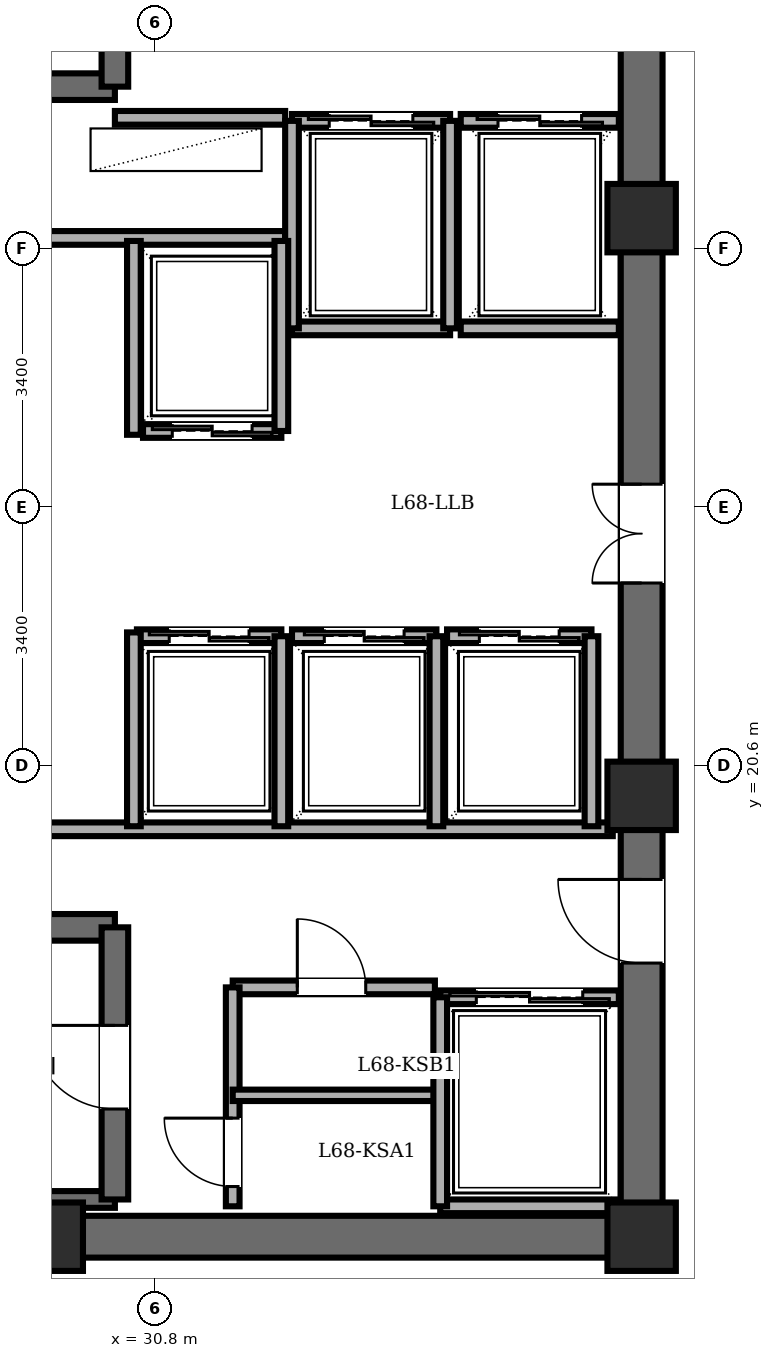
"""IFC4 building model, lengths in metres.
Left out: names, types, materials, properties, quantities, classifications, styles, units other than length and angle.
Written with IfcOpenShell. Run it as: python <this file> out.ifc"""

import sys

from ifc_helpers import new_model, si_unit, direction, frame, frame_2d, origin, origin_2d, place, context, subcontext, project, spatial, rectangle, extrude, element, fill, save


model = new_model("IFC4")
c1 = context("Model", 3, precision=1e-05, world=origin(), true_north=direction((0.0, 1.0)))
c2 = subcontext(c1, "Body", "Model", "MODEL_VIEW")
j1 = project(units=[si_unit("LENGTHUNIT", "METRE"), si_unit("PLANEANGLEUNIT", "RADIAN")], contexts=[c1])
p1 = place(None, origin())
s1 = spatial("IfcSite", under=j1, at=p1, CompositionType="ELEMENT")
p2 = place(p1, origin())
s2 = spatial("IfcBuilding", under=s1, at=p2, CompositionType="ELEMENT")
p3 = place(p2, frame((0.0, 0.0, 262.45)))
s3 = spatial("IfcBuildingStorey", under=s2, at=p3, CompositionType="ELEMENT", Elevation=262.45)
for number, where, z_axis, x_axis in (
    (1, (29.4, 14.4, 0.0), (0.0, 0.0, 1.0), (1.0, 0.0, 0.0)),
    (2, (37.2, 14.4, 0.0), (0.0, 0.0, 1.0), (1.0, 0.0, 0.0)),
    (3, (37.2, 20.2, 0.0), (0.0, 0.0, 1.0), (1.0, 0.0, 0.0)),
    (4, (37.2, 27.8, 0.0), (0.0, 0.0, 1.0), (1.0, 0.0, 0.0)),
):
    element("IfcColumn", number, at=place(p3, frame(where, z_axis=z_axis, x_axis=x_axis)), inside=s3, PredefinedType="COLUMN", context=c2, shape_type="SweptSolid", body=[
        extrude(rectangle(XDim=0.9, YDim=0.9, at=origin_2d()), origin(), (0.0, 0.0, 1.0), 3.65),
    ])
p4 = place(p3, frame((37.2, 14.4, 0.0), z_axis=(0.0, 0.0, 1.0), x_axis=(-1.0, 0.0, 0.0)))
e5 = element("IfcWall", 5, at=p4, inside=s3, PredefinedType="SHEAR", context=c2, shape_type="SweptSolid", body=[
    extrude(rectangle(XDim=15.6, YDim=0.55, at=frame_2d((7.8, 0.0))), origin(), (0.0, 0.0, 1.0), 3.45),
])
p5 = place(p3, frame((37.2, 14.4, 0.0), z_axis=(0.0, 0.0, 1.0), x_axis=(0.0, 1.0, 0.0)))
e6 = element("IfcWall", 6, at=p5, inside=s3, PredefinedType="SHEAR", context=c2, shape_type="SweptSolid", body=[
    extrude(rectangle(XDim=19.2, YDim=0.55, at=frame_2d((9.6, 0.0))), origin(), (0.0, 0.0, 1.0), 3.45),
])
p6 = place(p5, frame((15.8, 0.0, 0.0)))
e7 = element("IfcOpeningElement", 7, at=p6, cuts=e6, PredefinedType="OPENING", context=c2, shape_type="SweptSolid", body=[
    extrude(rectangle(XDim=1.15, YDim=2.15, at=frame_2d((0.575, 1.075))), frame((0.0, 0.285, 0.0), z_axis=(0.0, -1.0, 0.0), x_axis=(1.0, 0.0, 0.0)), (0.0, 0.0, 1.0), 0.57),
])
p7 = place(p5, frame((3.6, 0.0, 0.0)))
e8 = element("IfcOpeningElement", 8, at=p7, cuts=e6, PredefinedType="OPENING", context=c2, shape_type="SweptSolid", body=[
    extrude(rectangle(XDim=1.1, YDim=2.15, at=frame_2d((0.55, 1.075))), frame((0.0, 0.285, 0.0), z_axis=(0.0, -1.0, 0.0), x_axis=(1.0, 0.0, 0.0)), (0.0, 0.0, 1.0), 0.57),
])
p8 = place(p5, frame((8.6, 0.0, 0.0)))
e9 = element("IfcOpeningElement", 9, at=p8, cuts=e6, PredefinedType="OPENING", context=c2, shape_type="SweptSolid", body=[
    extrude(rectangle(XDim=1.3, YDim=2.2, at=frame_2d((0.65, 1.1))), frame((0.0, 0.285, 0.0), z_axis=(0.0, -1.0, 0.0), x_axis=(1.0, 0.0, 0.0)), (0.0, 0.0, 1.0), 0.57),
])
p9 = place(p3, frame((22.48, 29.53, 0.0), z_axis=(0.0, 0.0, 1.0), x_axis=(1.0, 0.0, 0.0)))
e10 = element("IfcWall", 10, at=p9, inside=s3, PredefinedType="SOLIDWALL", context=c2, shape_type="SweptSolid", body=[
    extrude(rectangle(XDim=7.79, YDim=0.35, at=frame_2d((3.895, 0.0))), origin(), (0.0, 0.0, 1.0), 3.45),
])
p10 = place(p3, frame((30.27, 29.53, 0.0), z_axis=(0.0, 0.0, 1.0), x_axis=(0.0, 1.0, 0.0)))
e11 = element("IfcWall", 11, at=p10, inside=s3, PredefinedType="SOLIDWALL", context=c2, shape_type="SweptSolid", body=[
    extrude(rectangle(XDim=3.58, YDim=0.35, at=frame_2d((1.79, 0.0))), origin(), (0.0, 0.0, 1.0), 3.45),
])
p11 = place(p10, frame((1.25, 0.0, 0.0)))
e12 = element("IfcOpeningElement", 12, at=p11, cuts=e11, PredefinedType="OPENING", context=c2, shape_type="SweptSolid", body=[
    extrude(rectangle(XDim=1.1, YDim=2.15, at=frame_2d((0.55, 1.075))), frame((0.0, 0.185, 0.0), z_axis=(0.0, -1.0, 0.0), x_axis=(1.0, 0.0, 0.0)), (0.0, 0.0, 1.0), 0.37),
])
p12 = place(p3, frame((22.48, 18.47, 0.0), z_axis=(0.0, 0.0, 1.0), x_axis=(1.0, 0.0, 0.0)))
e13 = element("IfcWall", 13, at=p12, inside=s3, PredefinedType="SOLIDWALL", context=c2, shape_type="SweptSolid", body=[
    extrude(rectangle(XDim=7.79, YDim=0.35, at=frame_2d((3.895, 0.0))), origin(), (0.0, 0.0, 1.0), 3.45),
])
p13 = place(p3, frame((22.48, 14.89, 0.0), z_axis=(0.0, 0.0, 1.0), x_axis=(1.0, 0.0, 0.0)))
e14 = element("IfcWall", 14, at=p13, inside=s3, PredefinedType="PARTITIONING", context=c2, shape_type="SweptSolid", body=[
    extrude(rectangle(XDim=7.79, YDim=0.22, at=frame_2d((3.895, 0.0))), origin(), (0.0, 0.0, 1.0), 3.45),
])
p14 = place(p3, frame((30.27, 14.89, 0.0), z_axis=(0.0, 0.0, 1.0), x_axis=(0.0, 1.0, 0.0)))
e15 = element("IfcWall", 15, at=p14, inside=s3, PredefinedType="SOLIDWALL", context=c2, shape_type="SweptSolid", body=[
    extrude(rectangle(XDim=3.58, YDim=0.35, at=frame_2d((1.79, 0.0))), origin(), (0.0, 0.0, 1.0), 3.45),
])
p15 = place(p14, frame((1.19, 0.0, 0.0)))
e16 = element("IfcOpeningElement", 16, at=p15, cuts=e15, PredefinedType="OPENING", context=c2, shape_type="SweptSolid", body=[
    extrude(rectangle(XDim=1.1, YDim=2.15, at=frame_2d((0.55, 1.075))), frame((0.0, 0.185, 0.0), z_axis=(0.0, -1.0, 0.0), x_axis=(1.0, 0.0, 0.0)), (0.0, 0.0, 1.0), 0.37),
])
p16 = place(p3, frame((30.27, 29.12, 0.0), z_axis=(0.0, 0.0, 1.0), x_axis=(1.0, 0.0, 0.0)))
e17 = element("IfcWall", 17, at=p16, inside=s3, PredefinedType="PARTITIONING", context=c2, shape_type="SweptSolid", body=[
    extrude(rectangle(XDim=2.24, YDim=0.18, at=frame_2d((1.12, 0.0))), origin(), (0.0, 0.0, 1.0), 3.45),
])
p17 = place(p3, frame((21.95, 27.54, 0.0), z_axis=(0.0, 0.0, 1.0), x_axis=(1.0, 0.0, 0.0)))
e18 = element("IfcWall", 18, at=p17, inside=s3, PredefinedType="PARTITIONING", context=c2, shape_type="SweptSolid", body=[
    extrude(rectangle(XDim=10.56, YDim=0.18, at=frame_2d((5.28, 0.0))), origin(), (0.0, 0.0, 1.0), 3.45),
])
p18 = place(p3, frame((21.95, 19.76, 0.0), z_axis=(0.0, 0.0, 1.0), x_axis=(1.0, 0.0, 0.0)))
e19 = element("IfcWall", 19, at=p18, inside=s3, PredefinedType="PARTITIONING", context=c2, shape_type="SweptSolid", body=[
    extrude(rectangle(XDim=14.87, YDim=0.18, at=frame_2d((7.435, 0.0))), origin(), (0.0, 0.0, 1.0), 3.45),
])
p19 = place(p3, frame((31.82, 17.68, 0.0), z_axis=(0.0, 0.0, 1.0), x_axis=(1.0, 0.0, 0.0)))
e20 = element("IfcWall", 20, at=p19, inside=s3, PredefinedType="PARTITIONING", context=c2, shape_type="SweptSolid", body=[
    extrude(rectangle(XDim=2.66, YDim=0.18, at=frame_2d((1.33, 0.0))), origin(), (0.0, 0.0, 1.0), 3.45),
])
p20 = place(p19, frame((0.85, 0.0, 0.0)))
e21 = element("IfcOpeningElement", 21, at=p20, cuts=e20, PredefinedType="OPENING", context=c2, shape_type="SweptSolid", body=[
    extrude(rectangle(XDim=0.9, YDim=2.05, at=frame_2d((0.45, 1.025))), frame((0.0, 0.1, 0.0), z_axis=(0.0, -1.0, 0.0), x_axis=(1.0, 0.0, 0.0)), (0.0, 0.0, 1.0), 0.2),
])
p21 = place(p3, frame((31.82, 14.8, 0.0), z_axis=(0.0, 0.0, 1.0), x_axis=(0.0, 1.0, 0.0)))
e22 = element("IfcWall", 22, at=p21, inside=s3, PredefinedType="PARTITIONING", context=c2, shape_type="SweptSolid", body=[
    extrude(rectangle(XDim=2.88, YDim=0.18, at=frame_2d((1.44, 0.0))), origin(), (0.0, 0.0, 1.0), 3.45),
])
p22 = place(p21, frame((0.26, 0.0, 0.0)))
e23 = element("IfcOpeningElement", 23, at=p22, cuts=e22, PredefinedType="OPENING", context=c2, shape_type="SweptSolid", body=[
    extrude(rectangle(XDim=0.9, YDim=2.05, at=frame_2d((0.45, 1.025))), frame((0.0, 0.1, 0.0), z_axis=(0.0, -1.0, 0.0), x_axis=(1.0, 0.0, 0.0)), (0.0, 0.0, 1.0), 0.2),
])
p23 = place(p3, frame((31.82, 16.26, 0.0), z_axis=(0.0, 0.0, 1.0), x_axis=(1.0, 0.0, 0.0)))
e24 = element("IfcWall", 24, at=p23, inside=s3, PredefinedType="PARTITIONING", context=c2, shape_type="SweptSolid", body=[
    extrude(rectangle(XDim=2.66, YDim=0.15, at=frame_2d((1.33, 0.0))), origin(), (0.0, 0.0, 1.0), 3.45),
])
p24 = place(p3, frame((32.6, 29.08, 0.0), z_axis=(0.0, 0.0, 1.0), x_axis=(1.0, 0.0, 0.0)))
e25 = element("IfcWall", 25, at=p24, inside=s3, PredefinedType="PARTITIONING", context=c2, shape_type="SweptSolid", body=[
    extrude(rectangle(XDim=2.08, YDim=0.18, at=frame_2d((1.04, 0.0))), origin(), (0.0, 0.0, 1.0), 3.45),
])
p25 = place(p24, frame((0.49, 0.0, 0.0)))
e26 = element("IfcOpeningElement", 26, at=p25, cuts=e25, PredefinedType="OPENING", context=c2, shape_type="SweptSolid", body=[
    extrude(rectangle(XDim=1.1, YDim=2.2, at=frame_2d((0.55, 1.1))), frame((0.0, 0.1, 0.0), z_axis=(0.0, -1.0, 0.0), x_axis=(1.0, 0.0, 0.0)), (0.0, 0.0, 1.0), 0.2),
])
p26 = place(p3, frame((34.68, 26.35, 0.0), z_axis=(0.0, 0.0, 1.0), x_axis=(-1.0, 0.0, 0.0)))
e27 = element("IfcWall", 27, at=p26, inside=s3, PredefinedType="PARTITIONING", context=c2, shape_type="SweptSolid", body=[
    extrude(rectangle(XDim=2.08, YDim=0.18, at=frame_2d((1.04, 0.0))), origin(), (0.0, 0.0, 1.0), 3.45),
])
for number, where, z_axis, x_axis in (
    (28, (34.68, 26.35, 0.0), (0.0, 0.0, 1.0), (0.0, 1.0, 0.0)),
    (29, (32.6, 29.08, 0.0), (0.0, 0.0, 1.0), (0.0, -1.0, 0.0)),
):
    element("IfcWall", number, at=place(p3, frame(where, z_axis=z_axis, x_axis=x_axis)), inside=s3, PredefinedType="PARTITIONING", context=c2, shape_type="SweptSolid", body=[
        extrude(rectangle(XDim=2.73, YDim=0.18, at=frame_2d((1.365, 0.0))), origin(), (0.0, 0.0, 1.0), 3.45),
    ])
p27 = place(p3, frame((34.82, 29.08, 0.0), z_axis=(0.0, 0.0, 1.0), x_axis=(1.0, 0.0, 0.0)))
e30 = element("IfcWall", 30, at=p27, inside=s3, PredefinedType="PARTITIONING", context=c2, shape_type="SweptSolid", body=[
    extrude(rectangle(XDim=2.08, YDim=0.18, at=frame_2d((1.04, 0.0))), origin(), (0.0, 0.0, 1.0), 3.45),
])
p28 = place(p27, frame((0.49, 0.0, 0.0)))
e31 = element("IfcOpeningElement", 31, at=p28, cuts=e30, PredefinedType="OPENING", context=c2, shape_type="SweptSolid", body=[
    extrude(rectangle(XDim=1.1, YDim=2.2, at=frame_2d((0.55, 1.1))), frame((0.0, 0.1, 0.0), z_axis=(0.0, -1.0, 0.0), x_axis=(1.0, 0.0, 0.0)), (0.0, 0.0, 1.0), 0.2),
])
p29 = place(p3, frame((36.9, 26.35, 0.0), z_axis=(0.0, 0.0, 1.0), x_axis=(-1.0, 0.0, 0.0)))
e32 = element("IfcWall", 32, at=p29, inside=s3, PredefinedType="PARTITIONING", context=c2, shape_type="SweptSolid", body=[
    extrude(rectangle(XDim=2.08, YDim=0.18, at=frame_2d((1.04, 0.0))), origin(), (0.0, 0.0, 1.0), 3.45),
])
p30 = place(p3, frame((34.55, 17.55, 0.0), z_axis=(0.0, 0.0, 1.0), x_axis=(1.0, 0.0, 0.0)))
e33 = element("IfcWall", 33, at=p30, inside=s3, PredefinedType="PARTITIONING", context=c2, shape_type="SweptSolid", body=[
    extrude(rectangle(XDim=2.35, YDim=0.18, at=frame_2d((1.175, 0.0))), origin(), (0.0, 0.0, 1.0), 3.45),
])
p31 = place(p30, frame((0.475, 0.0, 0.0)))
e34 = element("IfcOpeningElement", 34, at=p31, cuts=e33, PredefinedType="OPENING", context=c2, shape_type="SweptSolid", body=[
    extrude(rectangle(XDim=1.4, YDim=2.3, at=frame_2d((0.7, 1.15))), frame((0.0, 0.1, 0.0), z_axis=(0.0, -1.0, 0.0), x_axis=(1.0, 0.0, 0.0)), (0.0, 0.0, 1.0), 0.2),
])
p32 = place(p3, frame((36.9, 14.8, 0.0), z_axis=(0.0, 0.0, 1.0), x_axis=(-1.0, 0.0, 0.0)))
e35 = element("IfcWall", 35, at=p32, inside=s3, PredefinedType="PARTITIONING", context=c2, shape_type="SweptSolid", body=[
    extrude(rectangle(XDim=2.35, YDim=0.18, at=frame_2d((1.175, 0.0))), origin(), (0.0, 0.0, 1.0), 3.45),
])
p33 = place(p3, frame((34.55, 17.55, 0.0), z_axis=(0.0, 0.0, 1.0), x_axis=(0.0, -1.0, 0.0)))
e36 = element("IfcWall", 36, at=p33, inside=s3, PredefinedType="PARTITIONING", context=c2, shape_type="SweptSolid", body=[
    extrude(rectangle(XDim=2.75, YDim=0.18, at=frame_2d((1.375, 0.0))), origin(), (0.0, 0.0, 1.0), 3.45),
])
p34 = place(p3, frame((32.46, 25.0, 0.0), z_axis=(0.0, 0.0, 1.0), x_axis=(-1.0, 0.0, 0.0)))
e37 = element("IfcWall", 37, at=p34, inside=s3, PredefinedType="PARTITIONING", context=c2, shape_type="SweptSolid", body=[
    extrude(rectangle(XDim=1.82, YDim=0.18, at=frame_2d((0.91, 0.0))), origin(), (0.0, 0.0, 1.0), 3.45),
])
p35 = place(p34, frame((0.385, 0.0, 0.0)))
e38 = element("IfcOpeningElement", 38, at=p35, cuts=e37, PredefinedType="OPENING", context=c2, shape_type="SweptSolid", body=[
    extrude(rectangle(XDim=1.05, YDim=2.2, at=frame_2d((0.525, 1.1))), frame((0.0, 0.1, 0.0), z_axis=(0.0, -1.0, 0.0), x_axis=(1.0, 0.0, 0.0)), (0.0, 0.0, 1.0), 0.2),
])
p36 = place(p3, frame((32.46, 25.0, 0.0), z_axis=(0.0, 0.0, 1.0), x_axis=(0.0, 1.0, 0.0)))
e39 = element("IfcWall", 39, at=p36, inside=s3, PredefinedType="PARTITIONING", context=c2, shape_type="SweptSolid", body=[
    extrude(rectangle(XDim=2.5, YDim=0.18, at=frame_2d((1.25, 0.0))), origin(), (0.0, 0.0, 1.0), 3.45),
])
p37 = place(p3, frame((30.56, 22.3, 0.0), z_axis=(0.0, 0.0, 1.0), x_axis=(1.0, 0.0, 0.0)))
e40 = element("IfcWall", 40, at=p37, inside=s3, PredefinedType="PARTITIONING", context=c2, shape_type="SweptSolid", body=[
    extrude(rectangle(XDim=1.9, YDim=0.18, at=frame_2d((0.95, 0.0))), origin(), (0.0, 0.0, 1.0), 3.45),
])
p38 = place(p37, frame((0.425, 0.0, 0.0)))
e41 = element("IfcOpeningElement", 41, at=p38, cuts=e40, PredefinedType="OPENING", context=c2, shape_type="SweptSolid", body=[
    extrude(rectangle(XDim=1.05, YDim=2.2, at=frame_2d((0.525, 1.1))), frame((0.0, 0.1, 0.0), z_axis=(0.0, -1.0, 0.0), x_axis=(1.0, 0.0, 0.0)), (0.0, 0.0, 1.0), 0.2),
])
p39 = place(p3, frame((32.46, 19.8, 0.0), z_axis=(0.0, 0.0, 1.0), x_axis=(0.0, 1.0, 0.0)))
e42 = element("IfcWall", 42, at=p39, inside=s3, PredefinedType="PARTITIONING", context=c2, shape_type="SweptSolid", body=[
    extrude(rectangle(XDim=2.5, YDim=0.18, at=frame_2d((1.25, 0.0))), origin(), (0.0, 0.0, 1.0), 3.45),
])
p40 = place(p3, frame((32.6, 22.3, 0.0), z_axis=(0.0, 0.0, 1.0), x_axis=(1.0, 0.0, 0.0)))
e43 = element("IfcWall", 43, at=p40, inside=s3, PredefinedType="PARTITIONING", context=c2, shape_type="SweptSolid", body=[
    extrude(rectangle(XDim=1.9, YDim=0.18, at=frame_2d((0.95, 0.0))), origin(), (0.0, 0.0, 1.0), 3.45),
])
p41 = place(p40, frame((0.425, 0.0, 0.0)))
e44 = element("IfcOpeningElement", 44, at=p41, cuts=e43, PredefinedType="OPENING", context=c2, shape_type="SweptSolid", body=[
    extrude(rectangle(XDim=1.05, YDim=2.2, at=frame_2d((0.525, 1.1))), frame((0.0, 0.1, 0.0), z_axis=(0.0, -1.0, 0.0), x_axis=(1.0, 0.0, 0.0)), (0.0, 0.0, 1.0), 0.2),
])
p42 = place(p3, frame((34.5, 19.8, 0.0), z_axis=(0.0, 0.0, 1.0), x_axis=(0.0, 1.0, 0.0)))
e45 = element("IfcWall", 45, at=p42, inside=s3, PredefinedType="PARTITIONING", context=c2, shape_type="SweptSolid", body=[
    extrude(rectangle(XDim=2.5, YDim=0.18, at=frame_2d((1.25, 0.0))), origin(), (0.0, 0.0, 1.0), 3.45),
])
p43 = place(p3, frame((34.64, 22.3, 0.0), z_axis=(0.0, 0.0, 1.0), x_axis=(1.0, 0.0, 0.0)))
e46 = element("IfcWall", 46, at=p43, inside=s3, PredefinedType="PARTITIONING", context=c2, shape_type="SweptSolid", body=[
    extrude(rectangle(XDim=1.9, YDim=0.18, at=frame_2d((0.95, 0.0))), origin(), (0.0, 0.0, 1.0), 3.45),
])
p44 = place(p43, frame((0.425, 0.0, 0.0)))
e47 = element("IfcOpeningElement", 47, at=p44, cuts=e46, PredefinedType="OPENING", context=c2, shape_type="SweptSolid", body=[
    extrude(rectangle(XDim=1.05, YDim=2.2, at=frame_2d((0.525, 1.1))), frame((0.0, 0.1, 0.0), z_axis=(0.0, -1.0, 0.0), x_axis=(1.0, 0.0, 0.0)), (0.0, 0.0, 1.0), 0.2),
])
p45 = place(p3, frame((36.54, 19.8, 0.0), z_axis=(0.0, 0.0, 1.0), x_axis=(0.0, 1.0, 0.0)))
e48 = element("IfcWall", 48, at=p45, inside=s3, PredefinedType="PARTITIONING", context=c2, shape_type="SweptSolid", body=[
    extrude(rectangle(XDim=2.5, YDim=0.18, at=frame_2d((1.25, 0.0))), origin(), (0.0, 0.0, 1.0), 3.45),
])
for number, where, z_axis, x_axis in (
    (49, (30.52, 24.95, 0.0), (0.0, 0.0, 1.0), (0.0, 1.0, 0.0)),
    (50, (30.52, 19.8, 0.0), (0.0, 0.0, 1.0), (0.0, 1.0, 0.0)),
):
    element("IfcWall", number, at=place(p3, frame(where, z_axis=z_axis, x_axis=x_axis)), inside=s3, PredefinedType="PARTITIONING", context=c2, shape_type="SweptSolid", body=[
        extrude(rectangle(XDim=2.55, YDim=0.18, at=frame_2d((1.275, 0.0))), origin(), (0.0, 0.0, 1.0), 3.45),
    ])
p46 = place(p15, origin())
e51 = element("IfcDoor", 51, at=p46, inside=s3, OperationType="SINGLE_SWING_RIGHT", PredefinedType="DOOR", context=c2, shape_type="SweptSolid", body=[
    extrude(rectangle(XDim=1.1, YDim=2.15, at=frame_2d((0.55, 1.075))), frame((0.0, 0.025, 0.0), z_axis=(0.0, -1.0, 0.0), x_axis=(1.0, 0.0, 0.0)), (0.0, 0.0, 1.0), 0.05),
])
fill(e16, e51)
p47 = place(p7, origin())
e52 = element("IfcDoor", 52, at=p47, inside=s3, OperationType="SINGLE_SWING_RIGHT", PredefinedType="DOOR", context=c2, shape_type="SweptSolid", body=[
    extrude(rectangle(XDim=1.1, YDim=2.15, at=frame_2d((0.55, 1.075))), frame((0.0, 0.025, 0.0), z_axis=(0.0, -1.0, 0.0), x_axis=(1.0, 0.0, 0.0)), (0.0, 0.0, 1.0), 0.05),
])
fill(e8, e52)
p48 = place(p20, origin())
e53 = element("IfcDoor", 53, at=p48, inside=s3, OperationType="SINGLE_SWING_LEFT", PredefinedType="DOOR", context=c2, shape_type="SweptSolid", body=[
    extrude(rectangle(XDim=0.9, YDim=2.05, at=frame_2d((0.45, 1.025))), frame((0.0, 0.025, 0.0), z_axis=(0.0, -1.0, 0.0), x_axis=(1.0, 0.0, 0.0)), (0.0, 0.0, 1.0), 0.05),
])
fill(e21, e53)
p49 = place(p22, origin())
e54 = element("IfcDoor", 54, at=p49, inside=s3, OperationType="SINGLE_SWING_RIGHT", PredefinedType="DOOR", context=c2, shape_type="SweptSolid", body=[
    extrude(rectangle(XDim=0.9, YDim=2.05, at=frame_2d((0.45, 1.025))), frame((0.0, 0.025, 0.0), z_axis=(0.0, -1.0, 0.0), x_axis=(1.0, 0.0, 0.0)), (0.0, 0.0, 1.0), 0.05),
])
fill(e23, e54)
p50 = place(p25, origin())
e55 = element("IfcDoor", 55, at=p50, inside=s3, OperationType="DOUBLE_DOOR_SLIDING", PredefinedType="DOOR", context=c2, shape_type="SweptSolid", body=[
    extrude(rectangle(XDim=1.1, YDim=2.2, at=frame_2d((0.55, 1.1))), frame((0.0, 0.025, 0.0), z_axis=(0.0, -1.0, 0.0), x_axis=(1.0, 0.0, 0.0)), (0.0, 0.0, 1.0), 0.05),
])
fill(e26, e55)
p51 = place(p28, origin())
e56 = element("IfcDoor", 56, at=p51, inside=s3, OperationType="DOUBLE_DOOR_SLIDING", PredefinedType="DOOR", context=c2, shape_type="SweptSolid", body=[
    extrude(rectangle(XDim=1.1, YDim=2.2, at=frame_2d((0.55, 1.1))), frame((0.0, 0.025, 0.0), z_axis=(0.0, -1.0, 0.0), x_axis=(1.0, 0.0, 0.0)), (0.0, 0.0, 1.0), 0.05),
])
fill(e31, e56)
p52 = place(p31, origin())
e57 = element("IfcDoor", 57, at=p52, inside=s3, OperationType="DOUBLE_DOOR_SLIDING", PredefinedType="DOOR", context=c2, shape_type="SweptSolid", body=[
    extrude(rectangle(XDim=1.4, YDim=2.3, at=frame_2d((0.7, 1.15))), frame((0.0, 0.025, 0.0), z_axis=(0.0, -1.0, 0.0), x_axis=(1.0, 0.0, 0.0)), (0.0, 0.0, 1.0), 0.05),
])
fill(e34, e57)
p53 = place(p35, origin())
e58 = element("IfcDoor", 58, at=p53, inside=s3, OperationType="DOUBLE_DOOR_SLIDING", PredefinedType="DOOR", context=c2, shape_type="SweptSolid", body=[
    extrude(rectangle(XDim=1.05, YDim=2.2, at=frame_2d((0.525, 1.1))), frame((0.0, 0.025, 0.0), z_axis=(0.0, -1.0, 0.0), x_axis=(1.0, 0.0, 0.0)), (0.0, 0.0, 1.0), 0.05),
])
fill(e38, e58)
p54 = place(p38, origin())
e59 = element("IfcDoor", 59, at=p54, inside=s3, OperationType="DOUBLE_DOOR_SLIDING", PredefinedType="DOOR", context=c2, shape_type="SweptSolid", body=[
    extrude(rectangle(XDim=1.05, YDim=2.2, at=frame_2d((0.525, 1.1))), frame((0.0, 0.025, 0.0), z_axis=(0.0, -1.0, 0.0), x_axis=(1.0, 0.0, 0.0)), (0.0, 0.0, 1.0), 0.05),
])
fill(e41, e59)
p55 = place(p41, origin())
e60 = element("IfcDoor", 60, at=p55, inside=s3, OperationType="DOUBLE_DOOR_SLIDING", PredefinedType="DOOR", context=c2, shape_type="SweptSolid", body=[
    extrude(rectangle(XDim=1.05, YDim=2.2, at=frame_2d((0.525, 1.1))), frame((0.0, 0.025, 0.0), z_axis=(0.0, -1.0, 0.0), x_axis=(1.0, 0.0, 0.0)), (0.0, 0.0, 1.0), 0.05),
])
fill(e44, e60)
p56 = place(p44, origin())
e61 = element("IfcDoor", 61, at=p56, inside=s3, OperationType="DOUBLE_DOOR_SLIDING", PredefinedType="DOOR", context=c2, shape_type="SweptSolid", body=[
    extrude(rectangle(XDim=1.05, YDim=2.2, at=frame_2d((0.525, 1.1))), frame((0.0, 0.025, 0.0), z_axis=(0.0, -1.0, 0.0), x_axis=(1.0, 0.0, 0.0)), (0.0, 0.0, 1.0), 0.05),
])
fill(e47, e61)
p57 = place(p8, origin())
e62 = element("IfcDoor", 62, at=p57, inside=s3, OperationType="DOUBLE_DOOR_SINGLE_SWING", PredefinedType="DOOR", context=c2, shape_type="SweptSolid", body=[
    extrude(rectangle(XDim=1.3, YDim=2.2, at=frame_2d((0.65, 1.1))), frame((0.0, 0.025, 0.0), z_axis=(0.0, -1.0, 0.0), x_axis=(1.0, 0.0, 0.0)), (0.0, 0.0, 1.0), 0.05),
])
fill(e9, e62)
save(model, sys.argv[1])
